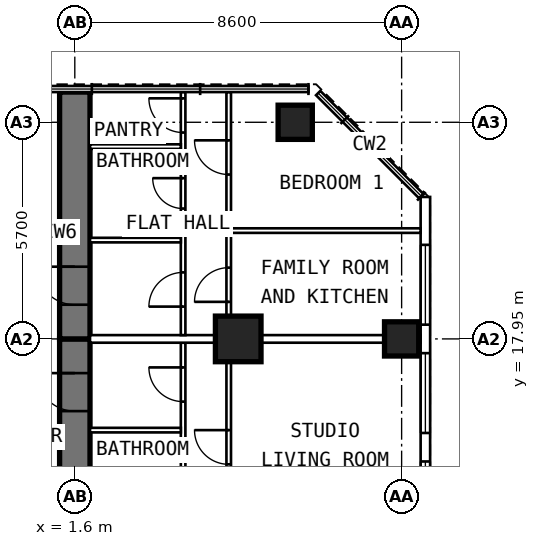
"""IFC4 building model, lengths in metres.
Left out: names, types, materials, properties, quantities, classifications, styles, units other than length and angle.
Written with IfcOpenShell. Run it as: python <this file> out.ifc"""

import sys

from ifc_helpers import new_model, si_unit, direction, frame, frame_2d, origin, origin_2d, place, context, subcontext, project, spatial, rectangle, extrude, element, fill, save


model = new_model("IFC4")
c1 = context("Model", 3, precision=1e-05, world=origin(), true_north=direction((0.0, 1.0)))
c2 = subcontext(c1, "Body", "Model", "MODEL_VIEW")
j1 = project(units=[si_unit("LENGTHUNIT", "METRE"), si_unit("PLANEANGLEUNIT", "RADIAN")], contexts=[c1])
p1 = place(None, origin())
s1 = spatial("IfcSite", under=j1, at=p1, CompositionType="ELEMENT")
p2 = place(p1, origin())
s2 = spatial("IfcBuilding", under=s1, at=p2, CompositionType="ELEMENT")
p3 = place(p2, frame((0.0, 0.0, 134.6)))
s3 = spatial("IfcBuildingStorey", under=s2, at=p3, CompositionType="ELEMENT", Elevation=134.6)
for number, where, z_axis, x_axis in (
    (1, (10.2, 17.95, 0.0), (0.0, 0.0, 1.0), (0.0, 1.0, 0.0)),
    (2, (7.4, 23.65, 0.0), (0.0, 0.0, 1.0), (0.0, 1.0, 0.0)),
):
    element("IfcColumn", number, at=place(p3, frame(where, z_axis=z_axis, x_axis=x_axis)), inside=s3, PredefinedType="COLUMN", context=c2, shape_type="SweptSolid", body=[
        extrude(rectangle(XDim=0.9, YDim=0.9, at=origin_2d()), origin(), (0.0, 0.0, 1.0), 3.6),
    ])
p4 = place(p3, frame((5.9, 17.95, 0.0), z_axis=(0.0, 0.0, 1.0), x_axis=(0.0, 1.0, 0.0)))
e3 = element("IfcColumn", 3, at=p4, inside=s3, PredefinedType="COLUMN", context=c2, shape_type="SweptSolid", body=[
    extrude(rectangle(XDim=1.2, YDim=1.2, at=origin_2d()), origin(), (0.0, 0.0, 1.0), 3.6),
])
p5 = place(p3, frame((1.6, 9.6, 0.0), z_axis=(0.0, 0.0, 1.0), x_axis=(0.0, 1.0, 0.0)))
e4 = element("IfcWall", 4, at=p5, inside=s3, PredefinedType="SHEAR", context=c2, shape_type="SweptSolid", body=[
    extrude(rectangle(XDim=8.35, YDim=0.8, at=frame_2d((4.175, 0.0))), origin(), (0.0, 0.0, 1.0), 3.6),
])
p6 = place(p5, frame((6.45, 0.0, 0.0)))
e5 = element("IfcOpeningElement", 5, at=p6, cuts=e4, PredefinedType="OPENING", context=c2, shape_type="SweptSolid", body=[
    extrude(rectangle(XDim=1.0, YDim=2.1, at=frame_2d((0.5, 1.05))), frame((0.0, 0.412, 0.0), z_axis=(0.0, -1.0, 0.0), x_axis=(1.0, 0.0, 0.0)), (0.0, 0.0, 1.0), 0.824),
])
p7 = place(p3, frame((1.6, 17.95, 0.0), z_axis=(0.0, 0.0, 1.0), x_axis=(0.0, 1.0, 0.0)))
e6 = element("IfcWall", 6, at=p7, inside=s3, PredefinedType="SHEAR", context=c2, shape_type="SweptSolid", body=[
    extrude(rectangle(XDim=6.495, YDim=0.8, at=frame_2d((3.248, 0.0))), origin(), (0.0, 0.0, 1.0), 3.6),
])
p8 = place(p7, frame((0.9, 0.0, 0.0)))
e7 = element("IfcOpeningElement", 7, at=p8, cuts=e6, PredefinedType="OPENING", context=c2, shape_type="SweptSolid", body=[
    extrude(rectangle(XDim=1.0, YDim=2.1, at=frame_2d((0.5, 1.05))), frame((0.0, 0.412, 0.0), z_axis=(0.0, -1.0, 0.0), x_axis=(1.0, 0.0, 0.0)), (0.0, 0.0, 1.0), 0.824),
])
p9 = place(p3, frame((10.825, 6.409, 0.0), z_axis=(0.0, 0.0, 1.0), x_axis=(0.0, 1.0, 0.0)))
e8 = element("IfcWall", 8, at=p9, inside=s3, PredefinedType="SOLIDWALL", context=c2, shape_type="SweptSolid", body=[
    extrude(rectangle(XDim=15.276, YDim=0.25, at=frame_2d((7.638, 0.0))), origin(), (0.0, 0.0, 1.0), 3.35),
])
p10 = place(p9, frame((0.516, 0.0, 0.8)))
e9 = element("IfcOpeningElement", 9, at=p10, cuts=e8, PredefinedType="OPENING", context=c2, shape_type="SweptSolid", body=[
    extrude(rectangle(XDim=2.1, YDim=1.8, at=frame_2d((1.05, 0.9))), frame((0.0, 0.137, 0.0), z_axis=(0.0, -1.0, 0.0), x_axis=(1.0, 0.0, 0.0)), (0.0, 0.0, 1.0), 0.274),
])
p11 = place(p9, frame((3.366, 0.0, 0.8)))
e10 = element("IfcOpeningElement", 10, at=p11, cuts=e8, PredefinedType="OPENING", context=c2, shape_type="SweptSolid", body=[
    extrude(rectangle(XDim=2.1, YDim=1.8, at=frame_2d((1.05, 0.9))), frame((0.0, 0.137, 0.0), z_axis=(0.0, -1.0, 0.0), x_axis=(1.0, 0.0, 0.0)), (0.0, 0.0, 1.0), 0.274),
])
p12 = place(p9, frame((6.216, 0.0, 0.8)))
e11 = element("IfcOpeningElement", 11, at=p12, cuts=e8, PredefinedType="OPENING", context=c2, shape_type="SweptSolid", body=[
    extrude(rectangle(XDim=2.1, YDim=1.8, at=frame_2d((1.05, 0.9))), frame((0.0, 0.137, 0.0), z_axis=(0.0, -1.0, 0.0), x_axis=(1.0, 0.0, 0.0)), (0.0, 0.0, 1.0), 0.274),
])
p13 = place(p9, frame((9.066, 0.0, 0.8)))
e12 = element("IfcOpeningElement", 12, at=p13, cuts=e8, PredefinedType="OPENING", context=c2, shape_type="SweptSolid", body=[
    extrude(rectangle(XDim=2.1, YDim=1.8, at=frame_2d((1.05, 0.9))), frame((0.0, 0.137, 0.0), z_axis=(0.0, -1.0, 0.0), x_axis=(1.0, 0.0, 0.0)), (0.0, 0.0, 1.0), 0.274),
])
p14 = place(p9, frame((11.916, 0.0, 0.8)))
e13 = element("IfcOpeningElement", 13, at=p14, cuts=e8, PredefinedType="OPENING", context=c2, shape_type="SweptSolid", body=[
    extrude(rectangle(XDim=2.1, YDim=1.8, at=frame_2d((1.05, 0.9))), frame((0.0, 0.137, 0.0), z_axis=(0.0, -1.0, 0.0), x_axis=(1.0, 0.0, 0.0)), (0.0, 0.0, 1.0), 0.274),
])
p15 = place(p3, frame((4.45, 10.05, 0.0), z_axis=(0.0, 0.0, 1.0), x_axis=(0.0, 1.0, 0.0)))
e14 = element("IfcWall", 14, at=p15, inside=s3, PredefinedType="PARTITIONING", context=c2, shape_type="SweptSolid", body=[
    extrude(rectangle(XDim=7.8, YDim=0.12, at=frame_2d((3.9, 0.0))), origin(), (0.0, 0.0, 1.0), 3.35),
])
p16 = place(p15, frame((0.61, 0.0, 0.0)))
e15 = element("IfcOpeningElement", 15, at=p16, cuts=e14, PredefinedType="OPENING", context=c2, shape_type="SweptSolid", body=[
    extrude(rectangle(XDim=0.9, YDim=2.1, at=frame_2d((0.45, 1.05))), frame((0.0, 0.072, 0.0), z_axis=(0.0, -1.0, 0.0), x_axis=(1.0, 0.0, 0.0)), (0.0, 0.0, 1.0), 0.144),
])
p17 = place(p15, frame((3.435, 0.0, 0.0)))
e16 = element("IfcOpeningElement", 16, at=p17, cuts=e14, PredefinedType="OPENING", context=c2, shape_type="SweptSolid", body=[
    extrude(rectangle(XDim=0.8, YDim=2.1, at=frame_2d((0.4, 1.05))), frame((0.0, 0.072, 0.0), z_axis=(0.0, -1.0, 0.0), x_axis=(1.0, 0.0, 0.0)), (0.0, 0.0, 1.0), 0.144),
])
p18 = place(p15, frame((6.25, 0.0, 0.0)))
e17 = element("IfcOpeningElement", 17, at=p18, cuts=e14, PredefinedType="OPENING", context=c2, shape_type="SweptSolid", body=[
    extrude(rectangle(XDim=0.9, YDim=2.1, at=frame_2d((0.45, 1.05))), frame((0.0, 0.072, 0.0), z_axis=(0.0, -1.0, 0.0), x_axis=(1.0, 0.0, 0.0)), (0.0, 0.0, 1.0), 0.144),
])
p19 = place(p3, frame((5.65, 9.6, 0.0), z_axis=(0.0, 0.0, 1.0), x_axis=(0.0, 1.0, 0.0)))
e18 = element("IfcWall", 18, at=p19, inside=s3, PredefinedType="PARTITIONING", context=c2, shape_type="SweptSolid", body=[
    extrude(rectangle(XDim=8.1, YDim=0.12, at=frame_2d((4.05, 0.0))), origin(), (0.0, 0.0, 1.0), 3.35),
])
p20 = place(p19, frame((5.05, 0.0, 0.0)))
e19 = element("IfcOpeningElement", 19, at=p20, cuts=e18, PredefinedType="OPENING", context=c2, shape_type="SweptSolid", body=[
    extrude(rectangle(XDim=0.9, YDim=2.1, at=frame_2d((0.45, 1.05))), frame((0.0, 0.072, 0.0), z_axis=(0.0, -1.0, 0.0), x_axis=(1.0, 0.0, 0.0)), (0.0, 0.0, 1.0), 0.144),
])
p21 = place(p3, frame((2.0, 15.55, 0.0), z_axis=(0.0, 0.0, 1.0), x_axis=(1.0, 0.0, 0.0)))
e20 = element("IfcWall", 20, at=p21, inside=s3, PredefinedType="PARTITIONING", context=c2, shape_type="SweptSolid", body=[
    extrude(rectangle(XDim=2.39, YDim=0.12, at=frame_2d((1.195, 0.0))), origin(), (0.0, 0.0, 1.0), 3.35),
])
p22 = place(p3, frame((4.45, 18.05, 0.0), z_axis=(0.0, 0.0, 1.0), x_axis=(0.0, 1.0, 0.0)))
e21 = element("IfcWall", 21, at=p22, inside=s3, PredefinedType="PARTITIONING", context=c2, shape_type="SweptSolid", body=[
    extrude(rectangle(XDim=6.395, YDim=0.12, at=frame_2d((3.198, 0.0))), origin(), (0.0, 0.0, 1.0), 3.35),
])
p23 = place(p22, frame((0.75, 0.0, 0.0)))
e22 = element("IfcOpeningElement", 22, at=p23, cuts=e21, PredefinedType="OPENING", context=c2, shape_type="SweptSolid", body=[
    extrude(rectangle(XDim=0.9, YDim=2.1, at=frame_2d((0.45, 1.05))), frame((0.0, 0.072, 0.0), z_axis=(0.0, -1.0, 0.0), x_axis=(1.0, 0.0, 0.0)), (0.0, 0.0, 1.0), 0.144),
])
p24 = place(p22, frame((3.33, 0.0, 0.0)))
e23 = element("IfcOpeningElement", 23, at=p24, cuts=e21, PredefinedType="OPENING", context=c2, shape_type="SweptSolid", body=[
    extrude(rectangle(XDim=0.8, YDim=2.1, at=frame_2d((0.4, 1.05))), frame((0.0, 0.072, 0.0), z_axis=(0.0, -1.0, 0.0), x_axis=(1.0, 0.0, 0.0)), (0.0, 0.0, 1.0), 0.144),
])
p25 = place(p22, frame((5.33, 0.0, 0.0)))
e24 = element("IfcOpeningElement", 24, at=p25, cuts=e21, PredefinedType="OPENING", context=c2, shape_type="SweptSolid", body=[
    extrude(rectangle(XDim=0.9, YDim=2.1, at=frame_2d((0.45, 1.05))), frame((0.0, 0.072, 0.0), z_axis=(0.0, -1.0, 0.0), x_axis=(1.0, 0.0, 0.0)), (0.0, 0.0, 1.0), 0.144),
])
p26 = place(p3, frame((5.65, 18.05, 0.0), z_axis=(0.0, 0.0, 1.0), x_axis=(0.0, 1.0, 0.0)))
e25 = element("IfcWall", 25, at=p26, inside=s3, PredefinedType="PARTITIONING", context=c2, shape_type="SweptSolid", body=[
    extrude(rectangle(XDim=6.395, YDim=0.12, at=frame_2d((3.198, 0.0))), origin(), (0.0, 0.0, 1.0), 3.35),
])
p27 = place(p26, frame((0.875, 0.0, 0.0)))
e26 = element("IfcOpeningElement", 26, at=p27, cuts=e25, PredefinedType="OPENING", context=c2, shape_type="SweptSolid", body=[
    extrude(rectangle(XDim=0.9, YDim=2.1, at=frame_2d((0.45, 1.05))), frame((0.0, 0.072, 0.0), z_axis=(0.0, -1.0, 0.0), x_axis=(1.0, 0.0, 0.0)), (0.0, 0.0, 1.0), 0.144),
])
p28 = place(p26, frame((4.225, 0.0, 0.0)))
e27 = element("IfcOpeningElement", 27, at=p28, cuts=e25, PredefinedType="OPENING", context=c2, shape_type="SweptSolid", body=[
    extrude(rectangle(XDim=0.9, YDim=2.1, at=frame_2d((0.45, 1.05))), frame((0.0, 0.072, 0.0), z_axis=(0.0, -1.0, 0.0), x_axis=(1.0, 0.0, 0.0)), (0.0, 0.0, 1.0), 0.144),
])
p29 = place(p3, frame((5.71, 20.8, 0.0), z_axis=(0.0, 0.0, 1.0), x_axis=(1.0, 0.0, 0.0)))
e28 = element("IfcWall", 28, at=p29, inside=s3, PredefinedType="PARTITIONING", context=c2, shape_type="SweptSolid", body=[
    extrude(rectangle(XDim=4.99, YDim=0.12, at=frame_2d((2.495, 0.0))), origin(), (0.0, 0.0, 1.0), 3.35),
])
for number, where, z_axis, x_axis in (
    (29, (2.0, 20.55, 0.0), (0.0, 0.0, 1.0), (1.0, 0.0, 0.0)),
    (30, (2.0, 23.01, 0.0), (0.0, 0.0, 1.0), (1.0, 0.0, 0.0)),
):
    element("IfcWall", number, at=place(p3, frame(where, z_axis=z_axis, x_axis=x_axis)), inside=s3, PredefinedType="PARTITIONING", context=c2, shape_type="SweptSolid", body=[
        extrude(rectangle(XDim=2.39, YDim=0.12, at=frame_2d((1.195, 0.0))), origin(), (0.0, 0.0, 1.0), 3.35),
    ])
p30 = place(p3, frame((2.0, 17.95, 0.0), z_axis=(0.0, 0.0, 1.0), x_axis=(1.0, 0.0, 0.0)))
e31 = element("IfcWall", 31, at=p30, inside=s3, PredefinedType="PARTITIONING", context=c2, shape_type="SweptSolid", body=[
    extrude(rectangle(XDim=8.7, YDim=0.2, at=frame_2d((4.35, 0.0))), origin(), (0.0, 0.0, 1.0), 2.45),
])
p31 = place(p3, frame((1.2, 20.75, 0.0), z_axis=(0.0, 0.0, 1.0), x_axis=(-1.0, 0.0, 0.0)))
e32 = element("IfcWall", 32, at=p31, inside=s3, PredefinedType="PARTITIONING", context=c2, shape_type="SweptSolid", body=[
    extrude(rectangle(XDim=2.4, YDim=0.15, at=frame_2d((1.2, 0.0))), origin(), (0.0, 0.0, 1.0), 3.35),
])
p32 = place(p31, frame((0.7, 0.0, 0.0)))
e33 = element("IfcOpeningElement", 33, at=p32, cuts=e32, PredefinedType="OPENING", context=c2, shape_type="SweptSolid", body=[
    extrude(rectangle(XDim=1.0, YDim=2.1, at=frame_2d((0.5, 1.05))), frame((0.0, 0.087, 0.0), z_axis=(0.0, -1.0, 0.0), x_axis=(1.0, 0.0, 0.0)), (0.0, 0.0, 1.0), 0.174),
])
p33 = place(p12, origin())
e34 = element("IfcWindow", 34, at=p33, inside=s3, PartitioningType="SINGLE_PANEL", PredefinedType="WINDOW", context=c2, shape_type="SweptSolid", body=[
    extrude(rectangle(XDim=2.1, YDim=1.8, at=frame_2d((1.05, 0.9))), frame((0.0, 0.03, 0.0), z_axis=(0.0, -1.0, 0.0), x_axis=(1.0, 0.0, 0.0)), (0.0, 0.0, 1.0), 0.06),
])
fill(e11, e34)
p34 = place(p13, origin())
e35 = element("IfcWindow", 35, at=p34, inside=s3, PartitioningType="SINGLE_PANEL", PredefinedType="WINDOW", context=c2, shape_type="SweptSolid", body=[
    extrude(rectangle(XDim=2.1, YDim=1.8, at=frame_2d((1.05, 0.9))), frame((0.0, 0.03, 0.0), z_axis=(0.0, -1.0, 0.0), x_axis=(1.0, 0.0, 0.0)), (0.0, 0.0, 1.0), 0.06),
])
fill(e12, e35)
p35 = place(p14, origin())
e36 = element("IfcWindow", 36, at=p35, inside=s3, PartitioningType="SINGLE_PANEL", PredefinedType="WINDOW", context=c2, shape_type="SweptSolid", body=[
    extrude(rectangle(XDim=2.1, YDim=1.8, at=frame_2d((1.05, 0.9))), frame((0.0, 0.03, 0.0), z_axis=(0.0, -1.0, 0.0), x_axis=(1.0, 0.0, 0.0)), (0.0, 0.0, 1.0), 0.06),
])
fill(e13, e36)
p36 = place(p6, origin())
e37 = element("IfcDoor", 37, at=p36, inside=s3, OperationType="SINGLE_SWING_RIGHT", PredefinedType="DOOR", context=c2, shape_type="SweptSolid", body=[
    extrude(rectangle(XDim=1.0, YDim=2.1, at=frame_2d((0.5, 1.05))), frame((0.0, 0.15, 0.0), z_axis=(0.0, -1.0, 0.0), x_axis=(1.0, 0.0, 0.0)), (0.0, 0.0, 1.0), 0.3),
])
fill(e5, e37)
p37 = place(p20, origin())
e38 = element("IfcDoor", 38, at=p37, inside=s3, OperationType="SINGLE_SWING_RIGHT", PredefinedType="DOOR", context=c2, shape_type="SweptSolid", body=[
    extrude(rectangle(XDim=0.9, YDim=2.1, at=frame_2d((0.45, 1.05))), frame((0.0, 0.025, 0.0), z_axis=(0.0, -1.0, 0.0), x_axis=(1.0, 0.0, 0.0)), (0.0, 0.0, 1.0), 0.05),
])
fill(e19, e38)
p38 = place(p18, origin())
e39 = element("IfcDoor", 39, at=p38, inside=s3, OperationType="SINGLE_SWING_RIGHT", PredefinedType="DOOR", context=c2, shape_type="SweptSolid", body=[
    extrude(rectangle(XDim=0.9, YDim=2.1, at=frame_2d((0.45, 1.05))), frame((0.0, 0.025, 0.0), z_axis=(0.0, -1.0, 0.0), x_axis=(1.0, 0.0, 0.0)), (0.0, 0.0, 1.0), 0.05),
])
fill(e17, e39)
p39 = place(p8, origin())
e40 = element("IfcDoor", 40, at=p39, inside=s3, OperationType="SINGLE_SWING_RIGHT", PredefinedType="DOOR", context=c2, shape_type="SweptSolid", body=[
    extrude(rectangle(XDim=1.0, YDim=2.1, at=frame_2d((0.5, 1.05))), frame((0.0, 0.15, 0.0), z_axis=(0.0, -1.0, 0.0), x_axis=(1.0, 0.0, 0.0)), (0.0, 0.0, 1.0), 0.3),
])
fill(e7, e40)
p40 = place(p27, origin())
e41 = element("IfcDoor", 41, at=p40, inside=s3, OperationType="SINGLE_SWING_LEFT", PredefinedType="DOOR", context=c2, shape_type="SweptSolid", body=[
    extrude(rectangle(XDim=0.9, YDim=2.1, at=frame_2d((0.45, 1.05))), frame((0.0, 0.025, 0.0), z_axis=(0.0, -1.0, 0.0), x_axis=(1.0, 0.0, 0.0)), (0.0, 0.0, 1.0), 0.05),
])
fill(e26, e41)
p41 = place(p28, origin())
e42 = element("IfcDoor", 42, at=p41, inside=s3, OperationType="SINGLE_SWING_RIGHT", PredefinedType="DOOR", context=c2, shape_type="SweptSolid", body=[
    extrude(rectangle(XDim=0.9, YDim=2.1, at=frame_2d((0.45, 1.05))), frame((0.0, 0.025, 0.0), z_axis=(0.0, -1.0, 0.0), x_axis=(1.0, 0.0, 0.0)), (0.0, 0.0, 1.0), 0.05),
])
fill(e27, e42)
p42 = place(p23, origin())
e43 = element("IfcDoor", 43, at=p42, inside=s3, OperationType="SINGLE_SWING_LEFT", PredefinedType="DOOR", context=c2, shape_type="SweptSolid", body=[
    extrude(rectangle(XDim=0.9, YDim=2.1, at=frame_2d((0.45, 1.05))), frame((0.0, 0.025, 0.0), z_axis=(0.0, -1.0, 0.0), x_axis=(1.0, 0.0, 0.0)), (0.0, 0.0, 1.0), 0.05),
])
fill(e22, e43)
p43 = place(p24, origin())
e44 = element("IfcDoor", 44, at=p43, inside=s3, OperationType="SINGLE_SWING_RIGHT", PredefinedType="DOOR", context=c2, shape_type="SweptSolid", body=[
    extrude(rectangle(XDim=0.8, YDim=2.1, at=frame_2d((0.4, 1.05))), frame((0.0, 0.025, 0.0), z_axis=(0.0, -1.0, 0.0), x_axis=(1.0, 0.0, 0.0)), (0.0, 0.0, 1.0), 0.05),
])
fill(e23, e44)
p44 = place(p25, origin())
e45 = element("IfcDoor", 45, at=p44, inside=s3, OperationType="SINGLE_SWING_RIGHT", PredefinedType="DOOR", context=c2, shape_type="SweptSolid", body=[
    extrude(rectangle(XDim=0.9, YDim=2.1, at=frame_2d((0.45, 1.05))), frame((0.0, 0.025, 0.0), z_axis=(0.0, -1.0, 0.0), x_axis=(1.0, 0.0, 0.0)), (0.0, 0.0, 1.0), 0.05),
])
fill(e24, e45)
save(model, sys.argv[1])
